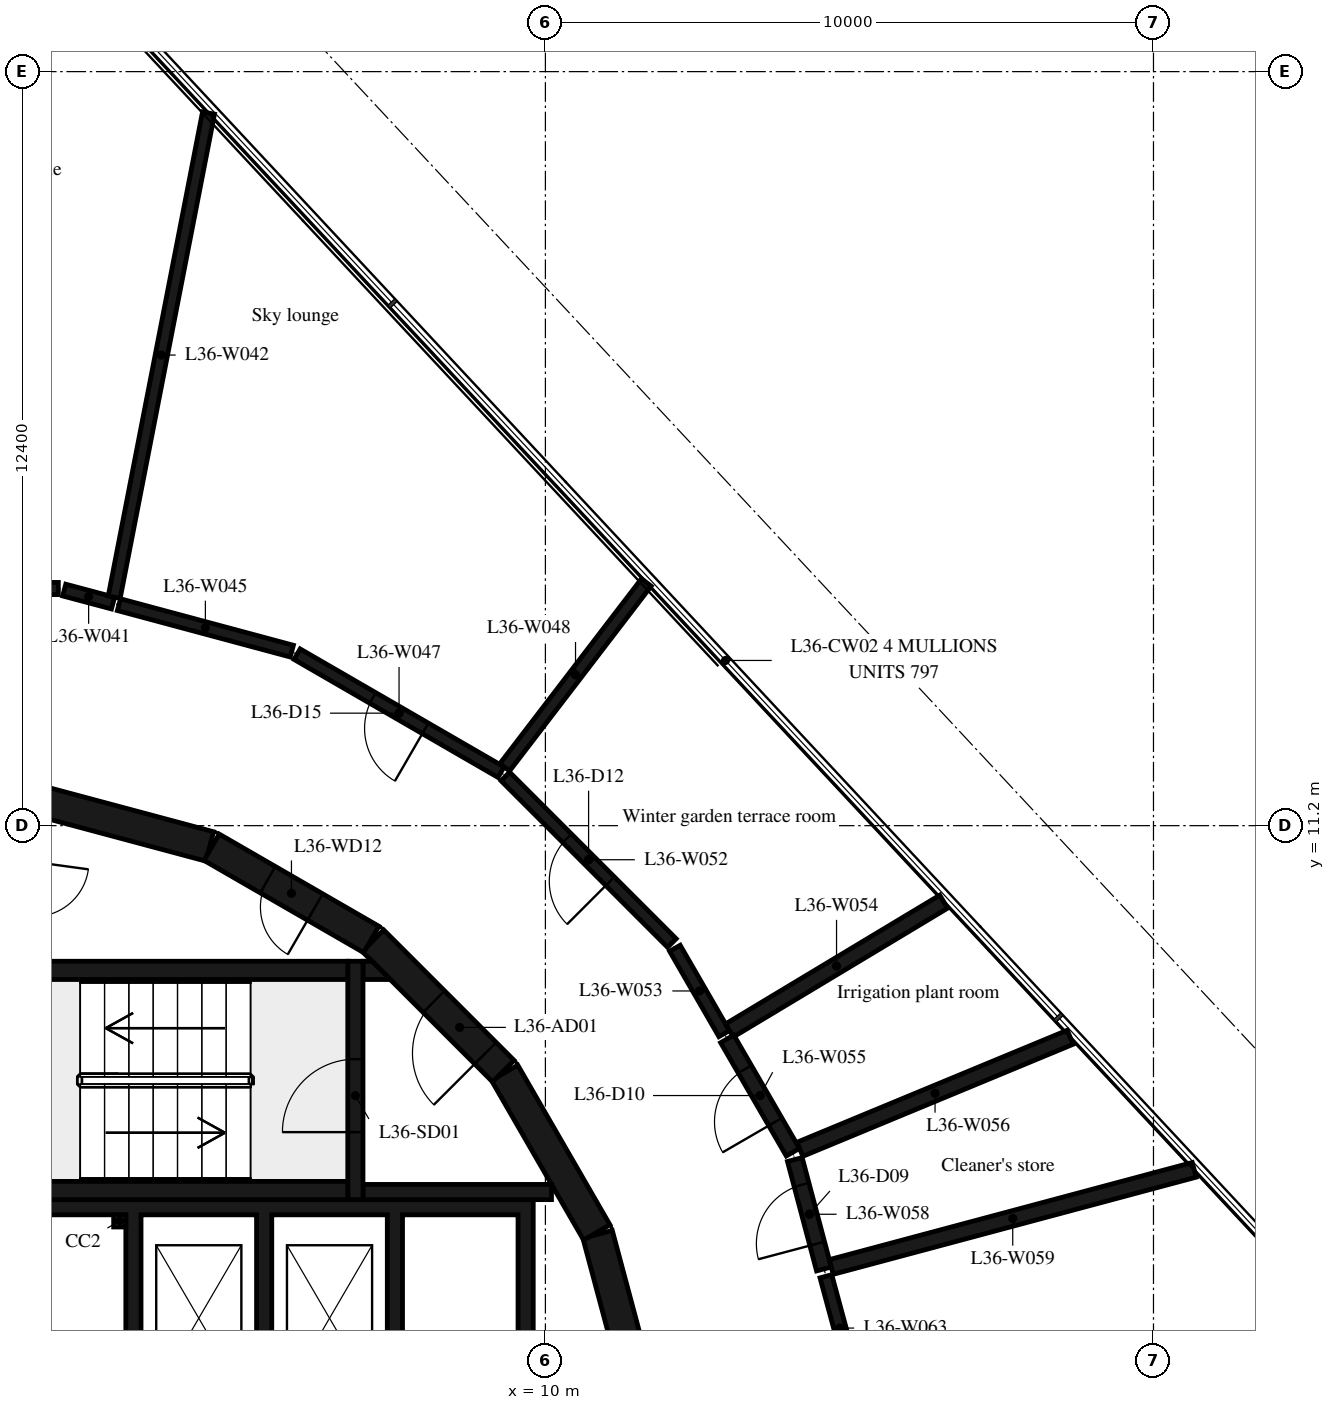
"""IFC4 building model, lengths in metres.
Left out: names, types, materials, properties, quantities, classifications, styles, units other than length and angle.
Written with IfcOpenShell. Run it as: python <this file> out.ifc"""

import sys

from ifc_helpers import new_model, si_unit, direction, frame, frame_2d, origin, origin_2d, place, context, subcontext, project, spatial, polyline, rectangle, outline, extrude, element, fill, save


model = new_model("IFC4")
c1 = context("Model", 3, precision=1e-05, world=origin(), true_north=direction((0.0, 1.0)))
c2 = subcontext(c1, "Body", "Model", "MODEL_VIEW")
j1 = project(units=[si_unit("LENGTHUNIT", "METRE"), si_unit("PLANEANGLEUNIT", "RADIAN")], contexts=[c1])
p1 = place(None, origin())
s1 = spatial("IfcSite", under=j1, at=p1, CompositionType="ELEMENT")
p2 = place(p1, origin())
s2 = spatial("IfcBuilding", under=s1, at=p2, CompositionType="ELEMENT")
p3 = place(p2, frame((0.0, 0.0, 144.9)))
s3 = spatial("IfcBuildingStorey", under=s2, at=p3, CompositionType="ELEMENT", Elevation=144.9)
p4 = place(p3, frame((3.0, 4.7, 0.0), z_axis=(0.0, 0.0, 1.0), x_axis=(1.0, 0.0, 0.0)))
e1 = element("IfcColumn", 1, at=p4, inside=s3, PredefinedType="COLUMN", context=c2, shape_type="SweptSolid", body=[
    extrude(rectangle(XDim=0.2, YDim=0.2, at=origin_2d()), origin(), (0.0, 0.0, 1.0), 4.75),
])
for number, where, z_axis, x_axis in (
    (2, (11.643, 1.55, 0.0), (0.0, 0.0, 1.0), (-0.259, 0.966, 0.0)),
    (3, (10.845, 4.51, 0.0), (0.0, 0.0, 1.0), (-0.5, 0.866, 0.0)),
):
    element("IfcWall", number, at=place(p3, frame(where, z_axis=z_axis, x_axis=x_axis)), inside=s3, PredefinedType="SHEAR", context=c2, shape_type="SweptSolid", body=[
        extrude(rectangle(XDim=3.033, YDim=0.5, at=frame_2d((1.516, 0.0))), origin(), (0.0, 0.0, 1.0), 6.35),
    ])
p5 = place(p3, frame((9.308, 7.164, 0.0), z_axis=(0.0, 0.0, 1.0), x_axis=(-0.707106781187, 0.707106781187, 0.0)))
e4 = element("IfcWall", 4, at=p5, inside=s3, PredefinedType="SHEAR", context=c2, shape_type="SweptSolid", body=[
    extrude(rectangle(XDim=3.032, YDim=0.5, at=frame_2d((1.516, 0.0))), origin(), (0.0, 0.0, 1.0), 6.35),
])
p6 = place(p5, frame((0.416, 0.0, 0.0)))
e5 = element("IfcOpeningElement", 5, at=p6, cuts=e4, PredefinedType="OPENING", context=c2, shape_type="SweptSolid", body=[
    extrude(rectangle(XDim=1.2, YDim=2.1, at=frame_2d((0.6, 1.05))), frame((0.0, 0.26, 0.0), z_axis=(0.0, -1.0, 0.0), x_axis=(1.0, 0.0, 0.0)), (0.0, 0.0, 1.0), 0.52),
])
p7 = place(p3, frame((7.137, 9.329, 0.0), z_axis=(0.0, 0.0, 1.0), x_axis=(-0.865975092491, 0.500087131594, 0.0)))
e6 = element("IfcWall", 6, at=p7, inside=s3, PredefinedType="SHEAR", context=c2, shape_type="SweptSolid", body=[
    extrude(rectangle(XDim=3.033, YDim=0.5, at=frame_2d((1.516, 0.0))), origin(), (0.0, 0.0, 1.0), 6.35),
])
p8 = place(p7, frame((1.066, 0.0, 0.0)))
e7 = element("IfcOpeningElement", 7, at=p8, cuts=e6, PredefinedType="OPENING", context=c2, shape_type="SweptSolid", body=[
    extrude(rectangle(XDim=0.9, YDim=2.1, at=frame_2d((0.45, 1.05))), frame((0.0, 0.26, 0.0), z_axis=(0.0, -1.0, 0.0), x_axis=(1.0, 0.0, 0.0)), (0.0, 0.0, 1.0), 0.52),
])
p9 = place(p3, frame((4.479, 10.858, 0.0), z_axis=(0.0, 0.0, 1.0), x_axis=(-0.965948410781, 0.258734743916, 0.0)))
e8 = element("IfcWall", 8, at=p9, inside=s3, PredefinedType="SHEAR", context=c2, shape_type="SweptSolid", body=[
    extrude(rectangle(XDim=3.033, YDim=0.5, at=frame_2d((1.516, 0.0))), origin(), (0.0, 0.0, 1.0), 6.35),
])
for number, where, z_axis, x_axis in (
    (9, (0.0, 5.2, 0.0), (0.0, 0.0, 1.0), (1.0, 0.0, 0.0)),
    (10, (0.0, 8.82, 0.0), (0.0, 0.0, 1.0), (1.0, 0.0, 0.0)),
):
    element("IfcWall", number, at=place(p3, frame(where, z_axis=z_axis, x_axis=x_axis)), inside=s3, PredefinedType="SHEAR", context=c2, shape_type="SweptSolid", body=[
        extrude(rectangle(XDim=6.75, YDim=0.3, at=frame_2d((3.375, 0.0))), origin(), (0.0, 0.0, 1.0), 6.35),
    ])
p10 = place(p3, frame((6.875, 5.05, 0.0), z_axis=(0.0, 0.0, 1.0), x_axis=(0.0, 1.0, 0.0)))
e11 = element("IfcWall", 11, at=p10, inside=s3, PredefinedType="SHEAR", context=c2, shape_type="SweptSolid", body=[
    extrude(rectangle(XDim=3.92, YDim=0.25, at=frame_2d((1.96, 0.0))), origin(), (0.0, 0.0, 1.0), 6.35),
])
p11 = place(p10, frame((1.11, 0.0, 0.0)))
e12 = element("IfcOpeningElement", 12, at=p11, cuts=e11, PredefinedType="OPENING", context=c2, shape_type="SweptSolid", body=[
    extrude(rectangle(XDim=1.2, YDim=2.1, at=frame_2d((0.6, 1.05))), frame((0.0, 0.135, 0.0), z_axis=(0.0, -1.0, 0.0), x_axis=(1.0, 0.0, 0.0)), (0.0, 0.0, 1.0), 0.27),
])
p12 = place(p3, frame((7.0, 5.175, 0.0), z_axis=(0.0, 0.0, 1.0), x_axis=(1.0, 0.0, 0.0)))
e13 = element("IfcWall", 13, at=p12, inside=s3, PredefinedType="SHEAR", context=c2, shape_type="SweptSolid", body=[
    extrude(rectangle(XDim=3.1, YDim=0.25, at=frame_2d((1.55, 0.0))), origin(), (0.0, 0.0, 1.0), 6.35),
])
p13 = place(p3, origin())
e14 = element("IfcWall", 14, at=p13, inside=s3, PredefinedType="SHEAR", context=c2, shape_type="SweptSolid", body=[
    extrude(outline(polyline([(7.448, 8.67), (7.0, 8.67), (7.0, 8.97), (7.148, 8.97), (7.448, 8.67)])), origin(), (0.0, 0.0, 1.0), 6.35),
])
p14 = place(p3, origin())
e15 = element("IfcWall", 15, at=p14, inside=s3, PredefinedType="SHEAR", context=c2, shape_type="SweptSolid", body=[
    extrude(outline(polyline([(-9.55, 4.8), (-7.65, 4.8), (-7.65, 1.9), (-7.4, 1.9), (-7.4, 4.8), (-5.5, 4.8), (-5.5, 1.9), (-5.25, 1.9), (-5.25, 4.8), (-3.35, 4.8), (-3.35, 1.9), (-3.1, 1.9), (-3.1, 4.8), (-1.2, 4.8), (-1.2, 1.9), (-0.95, 1.9), (-0.95, 4.8), (0.95, 4.8), (0.95, 1.9), (1.2, 1.9), (1.2, 4.8), (3.1, 4.8), (3.1, 1.9), (3.35, 1.9), (3.35, 4.8), (5.25, 4.8), (5.25, 1.9), (5.5, 1.9), (5.5, 4.8), (7.4, 4.8), (7.4, 1.9), (7.65, 1.9), (7.65, 4.8), (9.55, 4.8), (9.55, 1.9), (9.8, 1.9), (9.8, 4.8), (9.8, 5.05), (-9.8, 5.05), (-9.8, 4.8), (-9.8, 1.9), (-9.55, 1.9), (-9.55, 4.8)])), origin(), (0.0, 0.0, 1.0), 6.35),
])
p15 = place(p3, frame((1.99, 15.1, 0.0), z_axis=(0.0, 0.0, 1.0), x_axis=(-1.0, 0.0, 0.0)))
e16 = element("IfcWall", 16, at=p15, inside=s3, PredefinedType="PARTITIONING", context=c2, shape_type="SweptSolid", body=[
    extrude(rectangle(XDim=3.88, YDim=0.2, at=frame_2d((1.94, 0.0))), origin(), (0.0, 0.0, 1.0), 6.35),
])
p16 = place(p15, frame((1.44, 0.0, 0.0)))
e17 = element("IfcOpeningElement", 17, at=p16, cuts=e16, PredefinedType="OPENING", context=c2, shape_type="SweptSolid", body=[
    extrude(rectangle(XDim=1.0, YDim=2.1, at=frame_2d((0.5, 1.05))), frame((0.0, 0.11, 0.0), z_axis=(0.0, -1.0, 0.0), x_axis=(1.0, 0.0, 0.0)), (0.0, 0.0, 1.0), 0.22),
])
p17 = place(p3, frame((2.89, 14.86, 0.0), z_axis=(0.0, 0.0, 1.0), x_axis=(-0.966259308377, 0.257571250288, 0.0)))
e18 = element("IfcWall", 18, at=p17, inside=s3, PredefinedType="PARTITIONING", context=c2, shape_type="SweptSolid", body=[
    extrude(rectangle(XDim=0.831, YDim=0.2, at=frame_2d((0.416, 0.0))), origin(), (0.0, 0.0, 1.0), 6.35),
])
p18 = place(p3, frame((4.46, 22.92, 0.0), z_axis=(0.0, 0.0, 1.0), x_axis=(-0.191187868841, -0.981553462022, 0.0)))
e19 = element("IfcWall", 19, at=p18, inside=s3, PredefinedType="PARTITIONING", context=c2, shape_type="SweptSolid", body=[
    extrude(rectangle(XDim=8.111, YDim=0.2, at=frame_2d((4.056, 0.0))), origin(), (0.0, 0.0, 1.0), 6.35),
])
p19 = place(p3, frame((5.83, 14.07, 0.0), z_axis=(0.0, 0.0, 1.0), x_axis=(-0.965755722544, 0.259453048497, 0.0)))
e20 = element("IfcWall", 20, at=p19, inside=s3, PredefinedType="PARTITIONING", context=c2, shape_type="SweptSolid", body=[
    extrude(rectangle(XDim=2.944, YDim=0.2, at=frame_2d((1.472, 0.0))), origin(), (0.0, 0.0, 1.0), 6.35),
])
p20 = place(p3, frame((9.27, 12.08, 0.0), z_axis=(0.0, 0.0, 1.0), x_axis=(-0.865601686425, 0.500733182901, 0.0)))
e21 = element("IfcWall", 21, at=p20, inside=s3, PredefinedType="PARTITIONING", context=c2, shape_type="SweptSolid", body=[
    extrude(rectangle(XDim=3.874, YDim=0.2, at=frame_2d((1.937, 0.0))), origin(), (0.0, 0.0, 1.0), 6.35),
])
p21 = place(p20, frame((1.437, 0.0, 0.0)))
e22 = element("IfcOpeningElement", 22, at=p21, cuts=e21, PredefinedType="OPENING", context=c2, shape_type="SweptSolid", body=[
    extrude(rectangle(XDim=1.0, YDim=2.1, at=frame_2d((0.5, 1.05))), frame((0.0, 0.11, 0.0), z_axis=(0.0, -1.0, 0.0), x_axis=(1.0, 0.0, 0.0)), (0.0, 0.0, 1.0), 0.22),
])
p22 = place(p3, frame((9.331, 12.159, 0.0), z_axis=(0.0, 0.0, 1.0), x_axis=(0.608107648531, 0.793854575976, 0.0)))
e23 = element("IfcWall", 23, at=p22, inside=s3, PredefinedType="PARTITIONING", context=c2, shape_type="SweptSolid", body=[
    extrude(rectangle(XDim=3.83, YDim=0.2, at=frame_2d((1.915, 0.0))), origin(), (0.0, 0.0, 1.0), 6.35),
])
p23 = place(p3, frame((12.08, 9.27, 0.0), z_axis=(0.0, 0.0, 1.0), x_axis=(-0.707106781187, 0.707106781187, 0.0)))
e24 = element("IfcWall", 24, at=p23, inside=s3, PredefinedType="PARTITIONING", context=c2, shape_type="SweptSolid", body=[
    extrude(rectangle(XDim=3.874, YDim=0.2, at=frame_2d((1.937, 0.0))), origin(), (0.0, 0.0, 1.0), 6.35),
])
p24 = place(p23, frame((1.437, 0.0, 0.0)))
e25 = element("IfcOpeningElement", 25, at=p24, cuts=e24, PredefinedType="OPENING", context=c2, shape_type="SweptSolid", body=[
    extrude(rectangle(XDim=1.0, YDim=2.1, at=frame_2d((0.5, 1.05))), frame((0.0, 0.11, 0.0), z_axis=(0.0, -1.0, 0.0), x_axis=(1.0, 0.0, 0.0)), (0.0, 0.0, 1.0), 0.22),
])
p25 = place(p3, frame((12.94, 7.78, 0.0), z_axis=(0.0, 0.0, 1.0), x_axis=(-0.499931139538, 0.866065156741, 0.0)))
e26 = element("IfcWall", 26, at=p25, inside=s3, PredefinedType="PARTITIONING", context=c2, shape_type="SweptSolid", body=[
    extrude(rectangle(XDim=1.62, YDim=0.2, at=frame_2d((0.81, 0.0))), origin(), (0.0, 0.0, 1.0), 6.35),
])
p26 = place(p3, frame((13.026, 7.832, 0.0), z_axis=(0.0, 0.0, 1.0), x_axis=(0.85708928412, 0.515167894037, 0.0)))
e27 = element("IfcWall", 27, at=p26, inside=s3, PredefinedType="PARTITIONING", context=c2, shape_type="SweptSolid", body=[
    extrude(rectangle(XDim=4.112, YDim=0.25, at=frame_2d((2.056, 0.0))), origin(), (0.0, 0.0, 1.0), 6.35),
])
p27 = place(p3, frame((14.07, 5.83, 0.0), z_axis=(0.0, 0.0, 1.0), x_axis=(-0.501416067615, 0.865206291666, 0.0)))
e28 = element("IfcWall", 28, at=p27, inside=s3, PredefinedType="PARTITIONING", context=c2, shape_type="SweptSolid", body=[
    extrude(rectangle(XDim=2.154, YDim=0.25, at=frame_2d((1.077, 0.0))), origin(), (0.0, 0.0, 1.0), 6.35),
])
p28 = place(p27, frame((0.577, 0.0, 0.0)))
e29 = element("IfcOpeningElement", 29, at=p28, cuts=e28, PredefinedType="OPENING", context=c2, shape_type="SweptSolid", body=[
    extrude(rectangle(XDim=1.0, YDim=2.1, at=frame_2d((0.5, 1.05))), frame((0.0, 0.135, 0.0), z_axis=(0.0, -1.0, 0.0), x_axis=(1.0, 0.0, 0.0)), (0.0, 0.0, 1.0), 0.27),
])
p29 = place(p3, frame((14.186, 5.878, 0.0), z_axis=(0.0, 0.0, 1.0), x_axis=(0.923795968244, 0.382885112085, 0.0)))
e30 = element("IfcWall", 30, at=p29, inside=s3, PredefinedType="PARTITIONING", context=c2, shape_type="SweptSolid", body=[
    extrude(rectangle(XDim=4.811, YDim=0.25, at=frame_2d((2.406, 0.0))), origin(), (0.0, 0.0, 1.0), 6.35),
])
p30 = place(p3, frame((14.58, 3.91, 0.0), z_axis=(0.0, 0.0, 1.0), x_axis=(-0.256764718734, 0.966473941301, 0.0)))
e31 = element("IfcWall", 31, at=p30, inside=s3, PredefinedType="PARTITIONING", context=c2, shape_type="SweptSolid", body=[
    extrude(rectangle(XDim=1.862, YDim=0.25, at=frame_2d((0.931, 0.0))), origin(), (0.0, 0.0, 1.0), 6.35),
])
p31 = place(p30, frame((0.431, 0.0, 0.0)))
e32 = element("IfcOpeningElement", 32, at=p31, cuts=e31, PredefinedType="OPENING", context=c2, shape_type="SweptSolid", body=[
    extrude(rectangle(XDim=1.0, YDim=2.1, at=frame_2d((0.5, 1.05))), frame((0.0, 0.135, 0.0), z_axis=(0.0, -1.0, 0.0), x_axis=(1.0, 0.0, 0.0)), (0.0, 0.0, 1.0), 0.27),
])
p32 = place(p3, frame((14.701, 3.942, 0.0), z_axis=(0.0, 0.0, 1.0), x_axis=(0.965998462852, 0.258547809444, 0.0)))
e33 = element("IfcWall", 33, at=p32, inside=s3, PredefinedType="PARTITIONING", context=c2, shape_type="SweptSolid", body=[
    extrude(rectangle(XDim=6.179, YDim=0.25, at=frame_2d((3.09, 0.0))), origin(), (0.0, 0.0, 1.0), 6.35),
])
p33 = place(p3, frame((15.074, 2.086, 0.0), z_axis=(0.0, 0.0, 1.0), x_axis=(-0.261407417774, 0.965228554247, 0.0)))
e34 = element("IfcWall", 34, at=p33, inside=s3, PredefinedType="PARTITIONING", context=c2, shape_type="SweptSolid", body=[
    extrude(rectangle(XDim=1.764, YDim=0.2, at=frame_2d((0.882, 0.0))), origin(), (0.0, 0.0, 1.0), 6.35),
])
p34 = place(p11, origin())
e35 = element("IfcDoor", 35, at=p34, inside=s3, OperationType="SINGLE_SWING_LEFT", PredefinedType="DOOR", context=c2, shape_type="SweptSolid", body=[
    extrude(rectangle(XDim=1.2, YDim=2.1, at=frame_2d((0.6, 1.05))), frame((0.0, 0.025, 0.0), z_axis=(0.0, -1.0, 0.0), x_axis=(1.0, 0.0, 0.0)), (0.0, 0.0, 1.0), 0.05),
])
fill(e12, e35)
p35 = place(p6, origin())
e36 = element("IfcDoor", 36, at=p35, inside=s3, OperationType="SINGLE_SWING_RIGHT", PredefinedType="DOOR", context=c2, shape_type="SweptSolid", body=[
    extrude(rectangle(XDim=1.2, YDim=2.1, at=frame_2d((0.6, 1.05))), frame((0.0, 0.025, 0.0), z_axis=(0.0, -1.0, 0.0), x_axis=(1.0, 0.0, 0.0)), (0.0, 0.0, 1.0), 0.05),
])
fill(e5, e36)
p36 = place(p8, origin())
e37 = element("IfcDoor", 37, at=p36, inside=s3, OperationType="SINGLE_SWING_LEFT", PredefinedType="DOOR", context=c2, shape_type="SweptSolid", body=[
    extrude(rectangle(XDim=0.9, YDim=2.1, at=frame_2d((0.45, 1.05))), frame((0.0, 0.025, 0.0), z_axis=(0.0, -1.0, 0.0), x_axis=(1.0, 0.0, 0.0)), (0.0, 0.0, 1.0), 0.05),
])
fill(e7, e37)
p37 = place(p31, origin())
e38 = element("IfcDoor", 38, at=p37, inside=s3, OperationType="SINGLE_SWING_LEFT", PredefinedType="DOOR", context=c2, shape_type="SweptSolid", body=[
    extrude(rectangle(XDim=1.0, YDim=2.1, at=frame_2d((0.5, 1.05))), frame((0.0, 0.025, 0.0), z_axis=(0.0, -1.0, 0.0), x_axis=(1.0, 0.0, 0.0)), (0.0, 0.0, 1.0), 0.05),
])
fill(e32, e38)
p38 = place(p28, origin())
e39 = element("IfcDoor", 39, at=p38, inside=s3, OperationType="SINGLE_SWING_LEFT", PredefinedType="DOOR", context=c2, shape_type="SweptSolid", body=[
    extrude(rectangle(XDim=1.0, YDim=2.1, at=frame_2d((0.5, 1.05))), frame((0.0, 0.025, 0.0), z_axis=(0.0, -1.0, 0.0), x_axis=(1.0, 0.0, 0.0)), (0.0, 0.0, 1.0), 0.05),
])
fill(e29, e39)
p39 = place(p24, origin())
e40 = element("IfcDoor", 40, at=p39, inside=s3, OperationType="SINGLE_SWING_LEFT", PredefinedType="DOOR", context=c2, shape_type="SweptSolid", body=[
    extrude(rectangle(XDim=1.0, YDim=2.1, at=frame_2d((0.5, 1.05))), frame((0.0, 0.025, 0.0), z_axis=(0.0, -1.0, 0.0), x_axis=(1.0, 0.0, 0.0)), (0.0, 0.0, 1.0), 0.05),
])
fill(e25, e40)
p40 = place(p21, origin())
e41 = element("IfcDoor", 41, at=p40, inside=s3, OperationType="SINGLE_SWING_LEFT", PredefinedType="DOOR", context=c2, shape_type="SweptSolid", body=[
    extrude(rectangle(XDim=1.0, YDim=2.1, at=frame_2d((0.5, 1.05))), frame((0.0, 0.025, 0.0), z_axis=(0.0, -1.0, 0.0), x_axis=(1.0, 0.0, 0.0)), (0.0, 0.0, 1.0), 0.05),
])
fill(e22, e41)
save(model, sys.argv[1])
